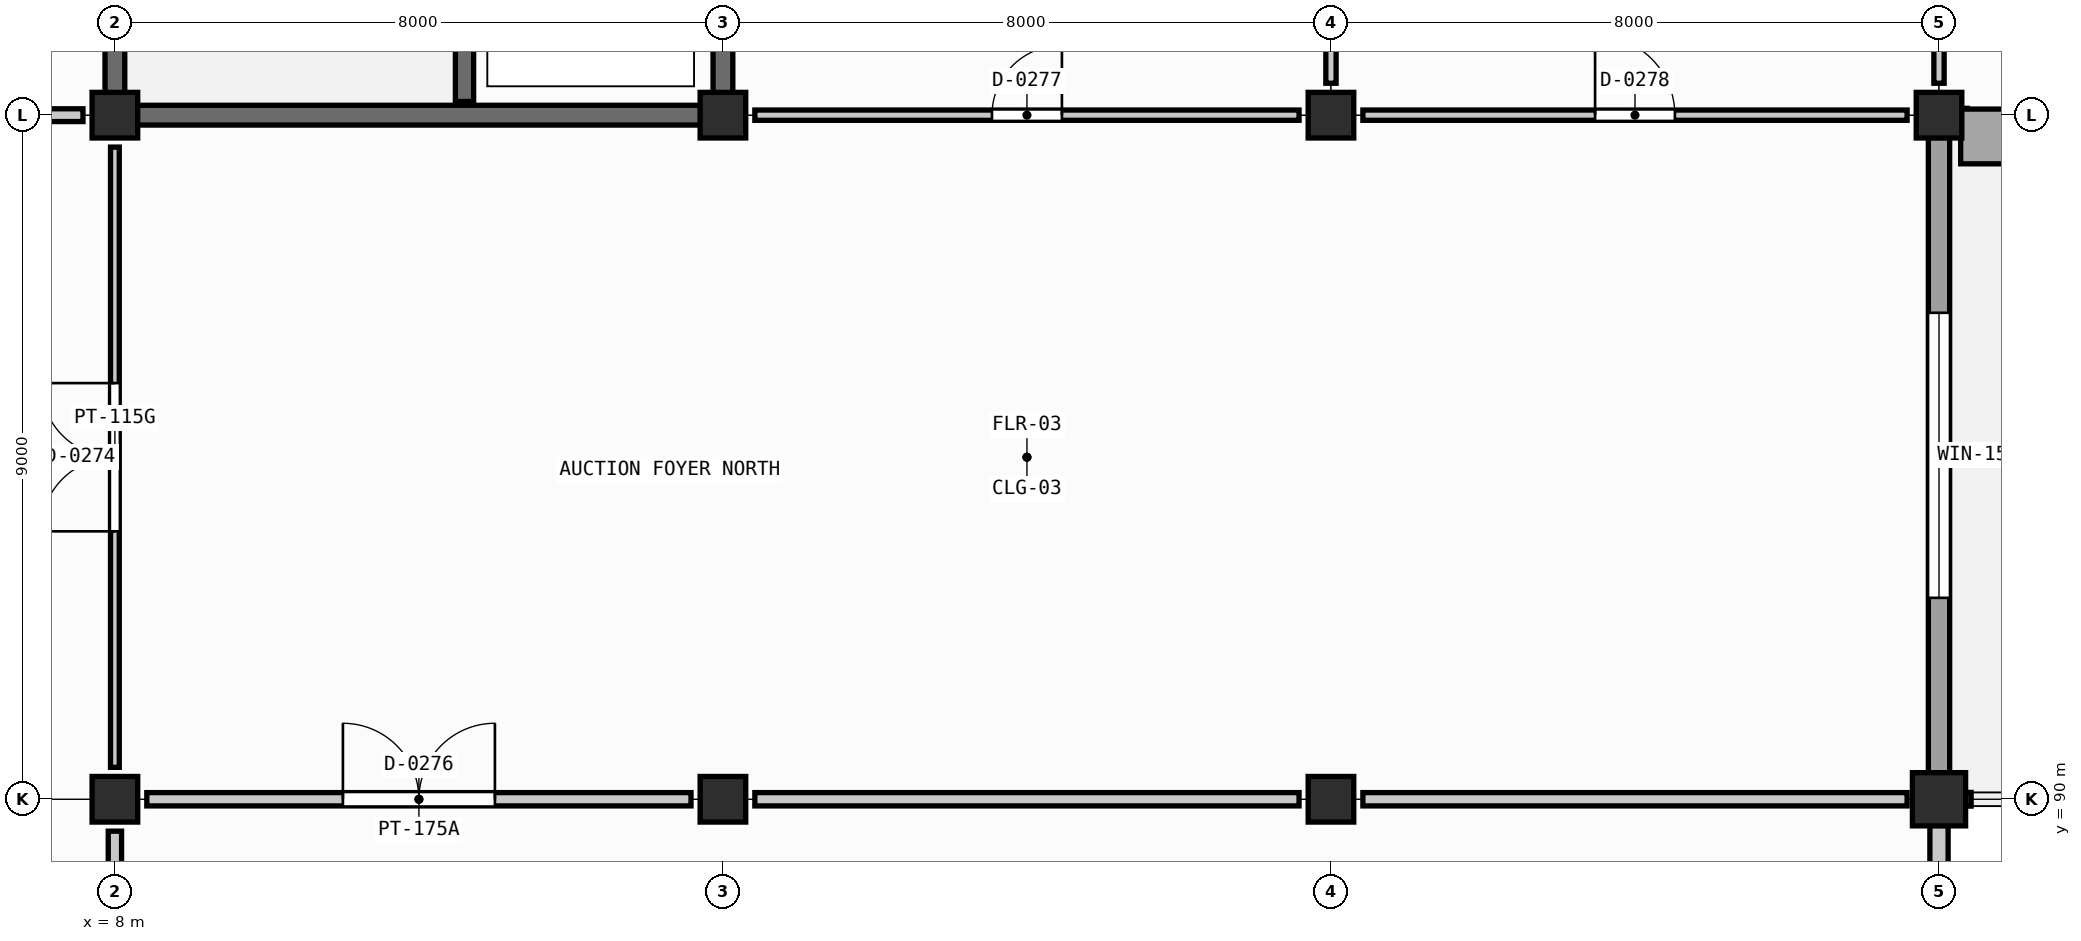
"""IFC4 building model, lengths in metres.
Left out: names, types, materials, properties, quantities, classifications, styles, units other than length and angle.
Written with IfcOpenShell. Run it as: python <this file> out.ifc"""

import sys

from ifc_helpers import new_model, si_unit, direction, frame, frame_2d, origin, origin_2d, place, context, subcontext, project, spatial, rectangle, extrude, element, fill, save


model = new_model("IFC4")
c1 = context("Model", 3, precision=1e-05, world=origin(), true_north=direction((0.0, 1.0)))
c2 = subcontext(c1, "Body", "Model", "MODEL_VIEW")
j1 = project(units=[si_unit("LENGTHUNIT", "METRE"), si_unit("PLANEANGLEUNIT", "RADIAN")], contexts=[c1])
p1 = place(None, origin())
s1 = spatial("IfcSite", under=j1, at=p1, CompositionType="ELEMENT")
p2 = place(p1, origin())
s2 = spatial("IfcBuilding", under=s1, at=p2, CompositionType="ELEMENT")
p3 = place(p2, frame((0.0, 0.0, 9.0)))
s3 = spatial("IfcBuildingStorey", under=s2, at=p3, CompositionType="ELEMENT", Elevation=9.0)
for number, where, z_axis, x_axis in (
    (1, (8.0, 90.0, 0.0), (0.0, 0.0, 1.0), (1.0, 0.0, 0.0)),
    (2, (8.0, 99.0, 0.0), (0.0, 0.0, 1.0), (1.0, 0.0, 0.0)),
    (3, (16.0, 90.0, 0.0), (0.0, 0.0, 1.0), (1.0, 0.0, 0.0)),
    (4, (16.0, 99.0, 0.0), (0.0, 0.0, 1.0), (1.0, 0.0, 0.0)),
    (5, (24.0, 90.0, 0.0), (0.0, 0.0, 1.0), (1.0, 0.0, 0.0)),
    (6, (24.0, 99.0, 0.0), (0.0, 0.0, 1.0), (1.0, 0.0, 0.0)),
):
    element("IfcColumn", number, at=place(p3, frame(where, z_axis=z_axis, x_axis=x_axis)), inside=s3, PredefinedType="COLUMN", context=c2, shape_type="SweptSolid", body=[
        extrude(rectangle(XDim=0.6, YDim=0.6, at=origin_2d()), origin(), (0.0, 0.0, 1.0), 4.2),
    ])
p4 = place(p3, frame((32.0, 90.0, 0.0), z_axis=(0.0, 0.0, 1.0), x_axis=(1.0, 0.0, 0.0)))
e7 = element("IfcColumn", 7, at=p4, inside=s3, PredefinedType="COLUMN", context=c2, shape_type="SweptSolid", body=[
    extrude(rectangle(XDim=0.7, YDim=0.7, at=origin_2d()), origin(), (0.0, 0.0, 1.0), 4.2),
])
p5 = place(p3, frame((32.0, 99.0, 0.0), z_axis=(0.0, 0.0, 1.0), x_axis=(1.0, 0.0, 0.0)))
e8 = element("IfcColumn", 8, at=p5, inside=s3, PredefinedType="COLUMN", context=c2, shape_type="SweptSolid", body=[
    extrude(rectangle(XDim=0.6, YDim=0.6, at=origin_2d()), origin(), (0.0, 0.0, 1.0), 4.2),
])
p6 = place(p3, frame((32.0, 90.345, 0.0), z_axis=(0.0, 0.0, 1.0), x_axis=(0.0, 1.0, 0.0)))
e9 = element("IfcWall", 9, at=p6, inside=s3, PredefinedType="SOLIDWALL", context=c2, shape_type="SweptSolid", body=[
    extrude(rectangle(XDim=8.36, YDim=0.28, at=frame_2d((4.18, 0.0))), origin(), (0.0, 0.0, 1.0), 3.05),
])
p7 = place(p6, frame((2.305, 0.0, 1.0)))
e10 = element("IfcOpeningElement", 10, at=p7, cuts=e9, PredefinedType="OPENING", context=c2, shape_type="SweptSolid", body=[
    extrude(rectangle(XDim=3.75, YDim=1.4, at=frame_2d((1.875, 0.7))), frame((0.0, 0.15, 0.0), z_axis=(0.0, -1.0, 0.0), x_axis=(1.0, 0.0, 0.0)), (0.0, 0.0, 1.0), 0.3),
])
p8 = place(p3, frame((32.0, 78.37, 0.0), z_axis=(0.0, 0.0, 1.0), x_axis=(0.0, 1.0, 0.0)))
e11 = element("IfcWall", 11, at=p8, inside=s3, PredefinedType="SOLIDWALL", context=c2, shape_type="SweptSolid", body=[
    extrude(rectangle(XDim=11.285, YDim=0.24, at=frame_2d((5.643, 0.0))), origin(), (0.0, 0.0, 1.0), 3.42),
])
p9 = place(p3, frame((8.295, 99.0, 0.0), z_axis=(0.0, 0.0, 1.0), x_axis=(1.0, 0.0, 0.0)))
e12 = element("IfcWall", 12, at=p9, inside=s3, PredefinedType="SHEAR", context=c2, shape_type="SweptSolid", body=[
    extrude(rectangle(XDim=7.41, YDim=0.26, at=frame_2d((3.705, 0.0))), origin(), (0.0, 0.0, 1.0), 3.985),
])
p10 = place(p3, frame((8.0, 99.295, 0.0), z_axis=(0.0, 0.0, 1.0), x_axis=(0.0, 1.0, 0.0)))
e13 = element("IfcWall", 13, at=p10, inside=s3, PredefinedType="SHEAR", context=c2, shape_type="SweptSolid", body=[
    extrude(rectangle(XDim=8.41, YDim=0.26, at=frame_2d((4.205, 0.0))), origin(), (0.0, 0.0, 1.0), 3.985),
])
p11 = place(p3, frame((16.0, 99.295, 0.0), z_axis=(0.0, 0.0, 1.0), x_axis=(0.0, 1.0, 0.0)))
e14 = element("IfcWall", 14, at=p11, inside=s3, PredefinedType="SHEAR", context=c2, shape_type="SweptSolid", body=[
    extrude(rectangle(XDim=8.41, YDim=0.26, at=frame_2d((4.205, 0.0))), origin(), (0.0, 0.0, 1.0), 3.985),
])
p12 = place(p11, frame((5.0, 0.0, 0.0)))
e15 = element("IfcOpeningElement", 15, at=p12, cuts=e14, PredefinedType="OPENING", context=c2, shape_type="SweptSolid", body=[
    extrude(rectangle(XDim=1.6, YDim=2.2, at=frame_2d((0.8, 1.1))), frame((0.0, 0.14, 0.0), z_axis=(0.0, -1.0, 0.0), x_axis=(1.0, 0.0, 0.0)), (0.0, 0.0, 1.0), 0.28),
])
p13 = place(p3, frame((12.6, 99.18, 0.0), z_axis=(0.0, 0.0, 1.0), x_axis=(0.0, 1.0, 0.0)))
e16 = element("IfcWall", 16, at=p13, inside=s3, PredefinedType="SHEAR", context=c2, shape_type="SweptSolid", body=[
    extrude(rectangle(XDim=8.64, YDim=0.24, at=frame_2d((4.32, 0.0))), origin(), (0.0, 0.0, 1.0), 3.985),
])
p14 = place(p13, frame((6.02, 0.0, 0.0)))
e17 = element("IfcOpeningElement", 17, at=p14, cuts=e16, PredefinedType="OPENING", context=c2, shape_type="SweptSolid", body=[
    extrude(rectangle(XDim=1.35, YDim=2.2, at=frame_2d((0.675, 1.1))), frame((0.0, 0.13, 0.0), z_axis=(0.0, -1.0, 0.0), x_axis=(1.0, 0.0, 0.0)), (0.0, 0.0, 1.0), 0.26),
])
p15 = place(p13, frame((7.68, 0.0, 0.0)))
e18 = element("IfcOpeningElement", 18, at=p15, cuts=e16, PredefinedType="OPENING", context=c2, shape_type="SweptSolid", body=[
    extrude(rectangle(XDim=0.88, YDim=2.02, at=frame_2d((0.44, 1.01))), frame((0.0, 0.13, 0.0), z_axis=(0.0, -1.0, 0.0), x_axis=(1.0, 0.0, 0.0)), (0.0, 0.0, 1.0), 0.26),
])
p16 = place(p3, frame((8.0, 78.42, 0.0), z_axis=(0.0, 0.0, 1.0), x_axis=(0.0, 1.0, 0.0)))
e19 = element("IfcWall", 19, at=p16, inside=s3, PredefinedType="PARTITIONING", context=c2, shape_type="SweptSolid", body=[
    extrude(rectangle(XDim=11.16, YDim=0.175, at=frame_2d((5.58, 0.0))), origin(), (0.0, 0.0, 1.0), 3.05),
])
p17 = place(p3, frame((8.0, 90.42, 0.0), z_axis=(0.0, 0.0, 1.0), x_axis=(0.0, 1.0, 0.0)))
e20 = element("IfcWall", 20, at=p17, inside=s3, PredefinedType="PARTITIONING", context=c2, shape_type="SweptSolid", body=[
    extrude(rectangle(XDim=8.16, YDim=0.115, at=frame_2d((4.08, 0.0))), origin(), (0.0, 0.0, 1.0), 3.05),
])
p18 = place(p17, frame((3.105, 0.0, 0.0)))
e21 = element("IfcOpeningElement", 21, at=p18, cuts=e20, PredefinedType="OPENING", context=c2, shape_type="SweptSolid", body=[
    extrude(rectangle(XDim=1.95, YDim=2.3, at=frame_2d((0.975, 1.15))), frame((0.0, 0.067, 0.0), z_axis=(0.0, -1.0, 0.0), x_axis=(1.0, 0.0, 0.0)), (0.0, 0.0, 1.0), 0.135),
])
p19 = place(p3, frame((0.42, 99.0, 0.0), z_axis=(0.0, 0.0, 1.0), x_axis=(1.0, 0.0, 0.0)))
e22 = element("IfcWall", 22, at=p19, inside=s3, PredefinedType="PARTITIONING", context=c2, shape_type="SweptSolid", body=[
    extrude(rectangle(XDim=7.16, YDim=0.168, at=frame_2d((3.58, 0.0))), origin(), (0.0, 0.0, 1.0), 3.05),
])
p20 = place(p19, frame((3.0, 0.0, 0.0)))
e23 = element("IfcOpeningElement", 23, at=p20, cuts=e22, PredefinedType="OPENING", context=c2, shape_type="SweptSolid", body=[
    extrude(rectangle(XDim=1.16, YDim=2.21, at=frame_2d((0.58, 1.105))), frame((0.0, 0.094, 0.0), z_axis=(0.0, -1.0, 0.0), x_axis=(1.0, 0.0, 0.0)), (0.0, 0.0, 1.0), 0.188),
])
p21 = place(p3, frame((8.42, 90.0, 0.0), z_axis=(0.0, 0.0, 1.0), x_axis=(1.0, 0.0, 0.0)))
e24 = element("IfcWall", 24, at=p21, inside=s3, PredefinedType="PARTITIONING", context=c2, shape_type="SweptSolid", body=[
    extrude(rectangle(XDim=7.16, YDim=0.175, at=frame_2d((3.58, 0.0))), origin(), (0.0, 0.0, 1.0), 3.05),
])
p22 = place(p21, frame((2.58, 0.0, 0.0)))
e25 = element("IfcOpeningElement", 25, at=p22, cuts=e24, PredefinedType="OPENING", context=c2, shape_type="SweptSolid", body=[
    extrude(rectangle(XDim=2.0, YDim=2.3, at=frame_2d((1.0, 1.15))), frame((0.0, 0.098, 0.0), z_axis=(0.0, -1.0, 0.0), x_axis=(1.0, 0.0, 0.0)), (0.0, 0.0, 1.0), 0.195),
])
for number, where, z_axis, x_axis in (
    (26, (16.42, 90.0, 0.0), (0.0, 0.0, 1.0), (1.0, 0.0, 0.0)),
    (27, (24.42, 90.0, 0.0), (0.0, 0.0, 1.0), (1.0, 0.0, 0.0)),
):
    element("IfcWall", number, at=place(p3, frame(where, z_axis=z_axis, x_axis=x_axis)), inside=s3, PredefinedType="PARTITIONING", context=c2, shape_type="SweptSolid", body=[
        extrude(rectangle(XDim=7.16, YDim=0.175, at=frame_2d((3.58, 0.0))), origin(), (0.0, 0.0, 1.0), 3.05),
    ])
p23 = place(p3, frame((16.42, 99.0, 0.0), z_axis=(0.0, 0.0, 1.0), x_axis=(1.0, 0.0, 0.0)))
e28 = element("IfcWall", 28, at=p23, inside=s3, PredefinedType="PLUMBINGWALL", context=c2, shape_type="SweptSolid", body=[
    extrude(rectangle(XDim=7.16, YDim=0.135, at=frame_2d((3.58, 0.0))), origin(), (0.0, 0.0, 1.0), 3.05),
])
p24 = place(p23, frame((3.12, 0.0, 0.0)))
e29 = element("IfcOpeningElement", 29, at=p24, cuts=e28, PredefinedType="OPENING", context=c2, shape_type="SweptSolid", body=[
    extrude(rectangle(XDim=0.92, YDim=2.08, at=frame_2d((0.46, 1.04))), frame((0.0, 0.078, 0.0), z_axis=(0.0, -1.0, 0.0), x_axis=(1.0, 0.0, 0.0)), (0.0, 0.0, 1.0), 0.155),
])
p25 = place(p3, frame((24.42, 99.0, 0.0), z_axis=(0.0, 0.0, 1.0), x_axis=(1.0, 0.0, 0.0)))
e30 = element("IfcWall", 30, at=p25, inside=s3, PredefinedType="PLUMBINGWALL", context=c2, shape_type="SweptSolid", body=[
    extrude(rectangle(XDim=7.16, YDim=0.135, at=frame_2d((3.58, 0.0))), origin(), (0.0, 0.0, 1.0), 3.05),
])
p26 = place(p25, frame((3.055, 0.0, 0.0)))
e31 = element("IfcOpeningElement", 31, at=p26, cuts=e30, PredefinedType="OPENING", context=c2, shape_type="SweptSolid", body=[
    extrude(rectangle(XDim=1.05, YDim=2.1, at=frame_2d((0.525, 1.05))), frame((0.0, 0.078, 0.0), z_axis=(0.0, -1.0, 0.0), x_axis=(1.0, 0.0, 0.0)), (0.0, 0.0, 1.0), 0.155),
])
for number, where, z_axis, x_axis in (
    (32, (24.0, 99.42, 0.0), (0.0, 0.0, 1.0), (0.0, 1.0, 0.0)),
    (33, (32.0, 99.42, 0.0), (0.0, 0.0, 1.0), (0.0, 1.0, 0.0)),
):
    element("IfcWall", number, at=place(p3, frame(where, z_axis=z_axis, x_axis=x_axis)), inside=s3, PredefinedType="PLUMBINGWALL", context=c2, shape_type="SweptSolid", body=[
        extrude(rectangle(XDim=8.16, YDim=0.135, at=frame_2d((4.08, 0.0))), origin(), (0.0, 0.0, 1.0), 3.05),
    ])
p27 = place(p7, origin())
e34 = element("IfcWindow", 34, at=p27, inside=s3, PartitioningType="SINGLE_PANEL", PredefinedType="WINDOW", context=c2, shape_type="SweptSolid", body=[
    extrude(rectangle(XDim=3.75, YDim=1.4, at=frame_2d((1.875, 0.7))), frame((0.0, 0.03, 0.0), z_axis=(0.0, -1.0, 0.0), x_axis=(1.0, 0.0, 0.0)), (0.0, 0.0, 1.0), 0.06),
])
fill(e10, e34)
p28 = place(p18, origin())
e35 = element("IfcDoor", 35, at=p28, inside=s3, OperationType="DOUBLE_DOOR_SINGLE_SWING", PredefinedType="DOOR", context=c2, shape_type="SweptSolid", body=[
    extrude(rectangle(XDim=1.95, YDim=2.3, at=frame_2d((0.975, 1.15))), frame((0.0, 0.025, 0.0), z_axis=(0.0, -1.0, 0.0), x_axis=(1.0, 0.0, 0.0)), (0.0, 0.0, 1.0), 0.05),
])
fill(e21, e35)
p29 = place(p22, origin())
e36 = element("IfcDoor", 36, at=p29, inside=s3, OperationType="DOUBLE_DOOR_SINGLE_SWING", PredefinedType="DOOR", context=c2, shape_type="SweptSolid", body=[
    extrude(rectangle(XDim=2.0, YDim=2.3, at=frame_2d((1.0, 1.15))), frame((0.0, 0.025, 0.0), z_axis=(0.0, -1.0, 0.0), x_axis=(1.0, 0.0, 0.0)), (0.0, 0.0, 1.0), 0.05),
])
fill(e25, e36)
p30 = place(p24, origin())
e37 = element("IfcDoor", 37, at=p30, inside=s3, OperationType="SINGLE_SWING_RIGHT", PredefinedType="DOOR", context=c2, shape_type="SweptSolid", body=[
    extrude(rectangle(XDim=0.92, YDim=2.08, at=frame_2d((0.46, 1.04))), frame((0.0, 0.025, 0.0), z_axis=(0.0, -1.0, 0.0), x_axis=(1.0, 0.0, 0.0)), (0.0, 0.0, 1.0), 0.05),
])
fill(e29, e37)
p31 = place(p26, origin())
e38 = element("IfcDoor", 38, at=p31, inside=s3, OperationType="SINGLE_SWING_LEFT", PredefinedType="DOOR", context=c2, shape_type="SweptSolid", body=[
    extrude(rectangle(XDim=1.05, YDim=2.1, at=frame_2d((0.525, 1.05))), frame((0.0, 0.025, 0.0), z_axis=(0.0, -1.0, 0.0), x_axis=(1.0, 0.0, 0.0)), (0.0, 0.0, 1.0), 0.05),
])
fill(e31, e38)
save(model, sys.argv[1])
